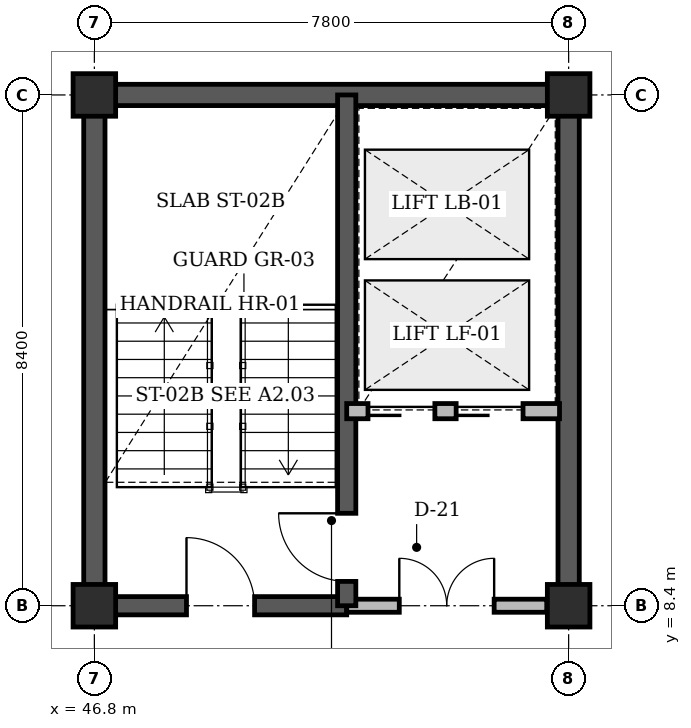
"""IFC4 building model, lengths in metres.
Left out: names, types, materials, properties, quantities, classifications, styles, units other than length and angle.
Written with IfcOpenShell. Run it as: python <this file> out.ifc"""

import sys

from ifc_helpers import new_model, si_unit, direction, frame, frame_2d, origin, origin_2d, place, context, subcontext, project, spatial, rectangle, extrude, element, fill, save


model = new_model("IFC4")
c1 = context("Model", 3, precision=1e-05, world=origin(), true_north=direction((0.0, 1.0)))
c2 = subcontext(c1, "Body", "Model", "MODEL_VIEW")
j1 = project(units=[si_unit("LENGTHUNIT", "METRE"), si_unit("PLANEANGLEUNIT", "RADIAN")], contexts=[c1])
p1 = place(None, origin())
s1 = spatial("IfcSite", under=j1, at=p1, CompositionType="ELEMENT")
p2 = place(p1, origin())
s2 = spatial("IfcBuilding", under=s1, at=p2, CompositionType="ELEMENT")
p3 = place(p2, frame((0.0, 0.0, 14.4)))
s3 = spatial("IfcBuildingStorey", under=s2, at=p3, CompositionType="ELEMENT", Elevation=14.4)
p4 = place(p3, frame((46.625, 16.8, 0.0), z_axis=(0.0, 0.0, 1.0), x_axis=(1.0, 0.0, 0.0)))
e1 = element("IfcWall", 1, at=p4, inside=s3, PredefinedType="SHEAR", context=c2, shape_type="SweptSolid", body=[
    extrude(rectangle(XDim=8.15, YDim=0.35, at=frame_2d((4.075, 0.0))), origin(), (0.0, 0.0, 1.0), 3.28),
])
for number, where, z_axis, x_axis in (
    (2, (46.8, 8.4, 0.0), (0.0, 0.0, 1.0), (0.0, 1.0, 0.0)),
    (3, (54.6, 8.4, 0.0), (0.0, 0.0, 1.0), (0.0, 1.0, 0.0)),
):
    element("IfcWall", number, at=place(p3, frame(where, z_axis=z_axis, x_axis=x_axis)), inside=s3, PredefinedType="SHEAR", context=c2, shape_type="SweptSolid", body=[
        extrude(rectangle(XDim=8.4, YDim=0.35, at=frame_2d((4.2, 0.0))), origin(), (0.0, 0.0, 1.0), 3.28),
    ])
for number, where, z_axis, x_axis in (
    (4, (46.8, 8.4, 0.0), (0.0, 0.0, 1.0), (1.0, 0.0, 0.0)),
    (5, (46.8, 16.8, 0.0), (0.0, 0.0, 1.0), (1.0, 0.0, 0.0)),
    (6, (54.6, 8.4, 0.0), (0.0, 0.0, 1.0), (1.0, 0.0, 0.0)),
    (7, (54.6, 16.8, 0.0), (0.0, 0.0, 1.0), (1.0, 0.0, 0.0)),
):
    element("IfcColumn", number, at=place(p3, frame(where, z_axis=z_axis, x_axis=x_axis)), inside=s3, PredefinedType="COLUMN", context=c2, shape_type="SweptSolid", body=[
        extrude(rectangle(XDim=0.7, YDim=0.7, at=origin_2d()), origin(), (0.0, 0.0, 1.0), 3.6),
    ])
p5 = place(p3, frame((46.8, 8.4, 0.0), z_axis=(0.0, 0.0, 1.0), x_axis=(1.0, 0.0, 0.0)))
e8 = element("IfcWall", 8, at=p5, inside=s3, PredefinedType="SHEAR", context=c2, shape_type="SweptSolid", body=[
    extrude(rectangle(XDim=4.15, YDim=0.3, at=frame_2d((2.075, 0.0))), origin(), (0.0, 0.0, 1.0), 3.6),
])
p6 = place(p5, frame((1.515, 0.0, 0.0)))
e9 = element("IfcOpeningElement", 9, at=p6, cuts=e8, PredefinedType="OPENING", context=c2, shape_type="SweptSolid", body=[
    extrude(rectangle(XDim=1.12, YDim=2.15, at=frame_2d((0.56, 1.075))), frame((0.0, 0.16, 0.0), z_axis=(0.0, -1.0, 0.0), x_axis=(1.0, 0.0, 0.0)), (0.0, 0.0, 1.0), 0.32),
])
p7 = place(p3, frame((50.95, 8.4, 0.0), z_axis=(0.0, 0.0, 1.0), x_axis=(1.0, 0.0, 0.0)))
e10 = element("IfcWall", 10, at=p7, inside=s3, PredefinedType="STANDARD", context=c2, shape_type="SweptSolid", body=[
    extrude(rectangle(XDim=3.29, YDim=0.215, at=frame_2d((1.645, 0.0))), origin(), (0.0, 0.0, 1.0), 2.62),
])
p8 = place(p7, frame((0.865, 0.0, 0.0)))
e11 = element("IfcOpeningElement", 11, at=p8, cuts=e10, PredefinedType="OPENING", context=c2, shape_type="SweptSolid", body=[
    extrude(rectangle(XDim=1.56, YDim=2.2, at=frame_2d((0.78, 1.1))), frame((0.0, 0.118, 0.0), z_axis=(0.0, -1.0, 0.0), x_axis=(1.0, 0.0, 0.0)), (0.0, 0.0, 1.0), 0.235),
])
p9 = place(p3, frame((50.95, 8.4, 0.0), z_axis=(0.0, 0.0, 1.0), x_axis=(0.0, 1.0, 0.0)))
e12 = element("IfcWall", 12, at=p9, inside=s3, PredefinedType="SHEAR", context=c2, shape_type="SweptSolid", body=[
    extrude(rectangle(XDim=8.4, YDim=0.3, at=frame_2d((4.2, 0.0))), origin(), (0.0, 0.0, 1.0), 3.6),
])
p10 = place(p9, frame((0.4, 0.0, 0.0)))
e13 = element("IfcOpeningElement", 13, at=p10, cuts=e12, PredefinedType="OPENING", context=c2, shape_type="SweptSolid", body=[
    extrude(rectangle(XDim=1.12, YDim=2.15, at=frame_2d((0.56, 1.075))), frame((0.0, 0.16, 0.0), z_axis=(0.0, -1.0, 0.0), x_axis=(1.0, 0.0, 0.0)), (0.0, 0.0, 1.0), 0.32),
])
p11 = place(p3, frame((50.95, 11.6, 0.0), z_axis=(0.0, 0.0, 1.0), x_axis=(1.0, 0.0, 0.0)))
e14 = element("IfcWall", 14, at=p11, inside=s3, PredefinedType="STANDARD", context=c2, shape_type="SweptSolid", body=[
    extrude(rectangle(XDim=3.5, YDim=0.25, at=frame_2d((1.75, 0.0))), origin(), (0.0, 0.0, 1.0), 3.3),
])
p12 = place(p11, frame((0.35, 0.0, 0.0)))
e15 = element("IfcOpeningElement", 15, at=p12, cuts=e14, PredefinedType="OPENING", context=c2, shape_type="SweptSolid", body=[
    extrude(rectangle(XDim=1.1, YDim=2.2, at=frame_2d((0.55, 1.1))), frame((0.0, 0.135, 0.0), z_axis=(0.0, -1.0, 0.0), x_axis=(1.0, 0.0, 0.0)), (0.0, 0.0, 1.0), 0.27),
])
p13 = place(p11, frame((1.8, 0.0, 0.0)))
e16 = element("IfcOpeningElement", 16, at=p13, cuts=e14, PredefinedType="OPENING", context=c2, shape_type="SweptSolid", body=[
    extrude(rectangle(XDim=1.1, YDim=2.2, at=frame_2d((0.55, 1.1))), frame((0.0, 0.135, 0.0), z_axis=(0.0, -1.0, 0.0), x_axis=(1.0, 0.0, 0.0)), (0.0, 0.0, 1.0), 0.27),
])
p14 = place(p6, origin())
e17 = element("IfcDoor", 17, at=p14, inside=s3, OperationType="SINGLE_SWING_LEFT", PredefinedType="DOOR", context=c2, shape_type="SweptSolid", body=[
    extrude(rectangle(XDim=1.12, YDim=2.15, at=frame_2d((0.56, 1.075))), frame((0.0, 0.025, 0.0), z_axis=(0.0, -1.0, 0.0), x_axis=(1.0, 0.0, 0.0)), (0.0, 0.0, 1.0), 0.05),
])
fill(e9, e17)
p15 = place(p8, origin())
e18 = element("IfcDoor", 18, at=p15, inside=s3, OperationType="DOUBLE_DOOR_SINGLE_SWING", PredefinedType="DOOR", context=c2, shape_type="SweptSolid", body=[
    extrude(rectangle(XDim=1.56, YDim=2.2, at=frame_2d((0.78, 1.1))), frame((0.0, 0.025, 0.0), z_axis=(0.0, -1.0, 0.0), x_axis=(1.0, 0.0, 0.0)), (0.0, 0.0, 1.0), 0.05),
])
fill(e11, e18)
p16 = place(p10, origin())
e19 = element("IfcDoor", 19, at=p16, inside=s3, OperationType="SINGLE_SWING_RIGHT", PredefinedType="DOOR", context=c2, shape_type="SweptSolid", body=[
    extrude(rectangle(XDim=1.12, YDim=2.15, at=frame_2d((0.56, 1.075))), frame((0.0, 0.025, 0.0), z_axis=(0.0, -1.0, 0.0), x_axis=(1.0, 0.0, 0.0)), (0.0, 0.0, 1.0), 0.05),
])
fill(e13, e19)
p17 = place(p12, origin())
e20 = element("IfcDoor", 20, at=p17, inside=s3, OperationType="SLIDING_TO_LEFT", PredefinedType="DOOR", context=c2, shape_type="SweptSolid", body=[
    extrude(rectangle(XDim=1.1, YDim=2.2, at=frame_2d((0.55, 1.1))), frame((0.0, 0.025, 0.0), z_axis=(0.0, -1.0, 0.0), x_axis=(1.0, 0.0, 0.0)), (0.0, 0.0, 1.0), 0.05),
])
fill(e15, e20)
p18 = place(p13, origin())
e21 = element("IfcDoor", 21, at=p18, inside=s3, OperationType="SLIDING_TO_LEFT", PredefinedType="DOOR", context=c2, shape_type="SweptSolid", body=[
    extrude(rectangle(XDim=1.1, YDim=2.2, at=frame_2d((0.55, 1.1))), frame((0.0, 0.025, 0.0), z_axis=(0.0, -1.0, 0.0), x_axis=(1.0, 0.0, 0.0)), (0.0, 0.0, 1.0), 0.05),
])
fill(e16, e21)
save(model, sys.argv[1])
